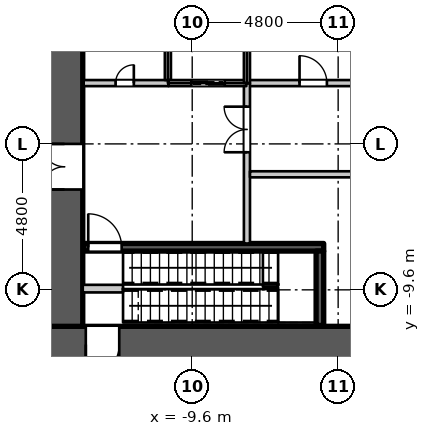
"""IFC4 building model, lengths in metres.
Left out: names, types, materials, properties, quantities, classifications, styles, units other than length and angle.
Written with IfcOpenShell. Run it as: python <this file> out.ifc"""

import sys

from ifc_helpers import new_model, si_unit, direction, frame, frame_2d, origin, place, context, subcontext, project, spatial, rectangle, extrude, element, fill, save


model = new_model("IFC4")
c1 = context("Model", 3, precision=1e-05, world=origin(), true_north=direction((0.0, 1.0)))
c2 = subcontext(c1, "Body", "Model", "MODEL_VIEW")
j1 = project(units=[si_unit("LENGTHUNIT", "METRE"), si_unit("PLANEANGLEUNIT", "RADIAN")], contexts=[c1])
p1 = place(None, origin())
s1 = spatial("IfcSite", under=j1, at=p1, CompositionType="ELEMENT")
p2 = place(p1, origin())
s2 = spatial("IfcBuilding", under=s1, at=p2, CompositionType="ELEMENT")
p3 = place(p2, origin())
s3 = spatial("IfcBuildingStorey", under=s2, at=p3, CompositionType="ELEMENT", Elevation=0.0)
p4 = place(p3, frame((-14.4, -11.4, 0.0), z_axis=(0.0, 0.0, 1.0), x_axis=(1.0, 0.0, 0.0)))
e1 = element("IfcWall", 1, at=p4, inside=s3, PredefinedType="SHEAR", context=c2, shape_type="SweptSolid", body=[
    extrude(rectangle(XDim=28.8, YDim=1.2, at=frame_2d((14.4, 0.0))), origin(), (0.0, 0.0, 1.0), 6.0),
])
p5 = place(p4, frame((1.3, 0.0, 0.0)))
e2 = element("IfcOpeningElement", 2, at=p5, cuts=e1, PredefinedType="OPENING", context=c2, shape_type="SweptSolid", body=[
    extrude(rectangle(XDim=1.1, YDim=2.2, at=frame_2d((0.55, 1.1))), frame((0.0, 0.61, 0.0), z_axis=(0.0, -1.0, 0.0), x_axis=(1.0, 0.0, 0.0)), (0.0, 0.0, 1.0), 1.22),
])
p6 = place(p4, frame((26.4, 0.0, 0.0)))
e3 = element("IfcOpeningElement", 3, at=p6, cuts=e1, PredefinedType="OPENING", context=c2, shape_type="SweptSolid", body=[
    extrude(rectangle(XDim=1.1, YDim=2.2, at=frame_2d((0.55, 1.1))), frame((0.0, 0.61, 0.0), z_axis=(0.0, -1.0, 0.0), x_axis=(1.0, 0.0, 0.0)), (0.0, 0.0, 1.0), 1.22),
])
p7 = place(p3, frame((-13.8, -10.8, 0.0), z_axis=(0.0, 0.0, 1.0), x_axis=(0.0, 1.0, 0.0)))
e4 = element("IfcWall", 4, at=p7, inside=s3, PredefinedType="SHEAR", context=c2, shape_type="SweptSolid", body=[
    extrude(rectangle(XDim=21.6, YDim=1.2, at=frame_2d((10.8, 0.0))), origin(), (0.0, 0.0, 1.0), 6.0),
])
p8 = place(p7, frame((15.5, 0.0, 0.0)))
e5 = element("IfcOpeningElement", 5, at=p8, cuts=e4, PredefinedType="OPENING", context=c2, shape_type="SweptSolid", body=[
    extrude(rectangle(XDim=1.5, YDim=2.4, at=frame_2d((0.75, 1.2))), frame((0.0, 0.61, 0.0), z_axis=(0.0, -1.0, 0.0), x_axis=(1.0, 0.0, 0.0)), (0.0, 0.0, 1.0), 1.22),
])
p9 = place(p7, frame((4.5, 0.0, 0.0)))
e6 = element("IfcOpeningElement", 6, at=p9, cuts=e4, PredefinedType="OPENING", context=c2, shape_type="SweptSolid", body=[
    extrude(rectangle(XDim=1.5, YDim=2.4, at=frame_2d((0.75, 1.2))), frame((0.0, 0.61, 0.0), z_axis=(0.0, -1.0, 0.0), x_axis=(1.0, 0.0, 0.0)), (0.0, 0.0, 1.0), 1.22),
])
p10 = place(p7, frame((19.13, 0.0, 0.0)))
e7 = element("IfcOpeningElement", 7, at=p10, cuts=e4, PredefinedType="OPENING", context=c2, shape_type="SweptSolid", body=[
    extrude(rectangle(XDim=1.1, YDim=2.2, at=frame_2d((0.55, 1.1))), frame((0.0, 0.61, 0.0), z_axis=(0.0, -1.0, 0.0), x_axis=(1.0, 0.0, 0.0)), (0.0, 0.0, 1.0), 1.22),
])
p11 = place(p3, frame((-7.82, -2.8, 0.0), z_axis=(0.0, 0.0, 1.0), x_axis=(1.0, 0.0, 0.0)))
e8 = element("IfcWall", 8, at=p11, inside=s3, PredefinedType="PARTITIONING", context=c2, shape_type="SweptSolid", body=[
    extrude(rectangle(XDim=4.44, YDim=0.2, at=frame_2d((2.22, 0.0))), origin(), (0.0, 0.0, 1.0), 5.65),
])
p12 = place(p11, frame((1.75, 0.0, 0.0)))
e9 = element("IfcOpeningElement", 9, at=p12, cuts=e8, PredefinedType="OPENING", context=c2, shape_type="SweptSolid", body=[
    extrude(rectangle(XDim=0.9, YDim=2.2, at=frame_2d((0.45, 1.1))), frame((0.0, 0.11, 0.0), z_axis=(0.0, -1.0, 0.0), x_axis=(1.0, 0.0, 0.0)), (0.0, 0.0, 1.0), 0.22),
])
p13 = place(p3, frame((-7.8, -8.075, 0.0), z_axis=(0.0, 0.0, 1.0), x_axis=(0.0, 1.0, 0.0)))
e10 = element("IfcWall", 10, at=p13, inside=s3, PredefinedType="PARTITIONING", context=c2, shape_type="SweptSolid", body=[
    extrude(rectangle(XDim=5.275, YDim=0.2, at=frame_2d((2.637, 0.0))), origin(), (0.0, 0.0, 1.0), 5.65),
])
p14 = place(p13, frame((3.0, 0.0, 0.0)))
e11 = element("IfcOpeningElement", 11, at=p14, cuts=e10, PredefinedType="OPENING", context=c2, shape_type="SweptSolid", body=[
    extrude(rectangle(XDim=1.5, YDim=2.4, at=frame_2d((0.75, 1.2))), frame((0.0, 0.11, 0.0), z_axis=(0.0, -1.0, 0.0), x_axis=(1.0, 0.0, 0.0)), (0.0, 0.0, 1.0), 0.22),
])
p15 = place(p3, frame((-7.7, -5.8, 0.0), z_axis=(0.0, 0.0, 1.0), x_axis=(1.0, 0.0, 0.0)))
e12 = element("IfcWall", 12, at=p15, inside=s3, PredefinedType="PARTITIONING", context=c2, shape_type="SweptSolid", body=[
    extrude(rectangle(XDim=20.87, YDim=0.2, at=frame_2d((10.435, 0.0))), origin(), (0.0, 0.0, 1.0), 5.65),
])
p16 = place(p15, frame((6.15, 0.0, 0.0)))
e13 = element("IfcOpeningElement", 13, at=p16, cuts=e12, PredefinedType="OPENING", context=c2, shape_type="SweptSolid", body=[
    extrude(rectangle(XDim=0.9, YDim=2.2, at=frame_2d((0.45, 1.1))), frame((0.0, 0.11, 0.0), z_axis=(0.0, -1.0, 0.0), x_axis=(1.0, 0.0, 0.0)), (0.0, 0.0, 1.0), 0.22),
])
p17 = place(p15, frame((16.45, 0.0, 0.0)))
e14 = element("IfcOpeningElement", 14, at=p17, cuts=e12, PredefinedType="OPENING", context=c2, shape_type="SweptSolid", body=[
    extrude(rectangle(XDim=0.9, YDim=2.2, at=frame_2d((0.45, 1.1))), frame((0.0, 0.11, 0.0), z_axis=(0.0, -1.0, 0.0), x_axis=(1.0, 0.0, 0.0)), (0.0, 0.0, 1.0), 0.22),
])
p18 = place(p3, frame((-13.17, -2.8, 0.0), z_axis=(0.0, 0.0, 1.0), x_axis=(1.0, 0.0, 0.0)))
e15 = element("IfcWall", 15, at=p18, inside=s3, PredefinedType="PARTITIONING", context=c2, shape_type="SweptSolid", body=[
    extrude(rectangle(XDim=2.79, YDim=0.2, at=frame_2d((1.395, 0.0))), origin(), (0.0, 0.0, 1.0), 5.65),
])
p19 = place(p18, frame((1.05, 0.0, 0.0)))
e16 = element("IfcOpeningElement", 16, at=p19, cuts=e15, PredefinedType="OPENING", context=c2, shape_type="SweptSolid", body=[
    extrude(rectangle(XDim=0.6, YDim=2.0, at=frame_2d((0.3, 1.0))), frame((0.0, 0.11, 0.0), z_axis=(0.0, -1.0, 0.0), x_axis=(1.0, 0.0, 0.0)), (0.0, 0.0, 1.0), 0.22),
])
p20 = place(p3, frame((-10.4, -2.7, 0.0), z_axis=(0.0, 0.0, 1.0), x_axis=(0.0, 1.0, 0.0)))
e17 = element("IfcWall", 17, at=p20, inside=s3, PredefinedType="PARTITIONING", context=c2, shape_type="SweptSolid", body=[
    extrude(rectangle(XDim=2.7, YDim=0.2, at=frame_2d((1.35, 0.0))), origin(), (0.0, 0.0, 1.0), 5.65),
])
p21 = place(p3, frame((-10.38, -2.8, 0.0), z_axis=(0.0, 0.0, 1.0), x_axis=(1.0, 0.0, 0.0)))
e18 = element("IfcWall", 18, at=p21, inside=s3, PredefinedType="PARTITIONING", context=c2, shape_type="SweptSolid", body=[
    extrude(rectangle(XDim=2.56, YDim=0.2, at=frame_2d((1.28, 0.0))), origin(), (0.0, 0.0, 1.0), 5.65),
])
p22 = place(p21, frame((0.75, 0.0, 0.0)))
e19 = element("IfcOpeningElement", 19, at=p22, cuts=e18, PredefinedType="OPENING", context=c2, shape_type="SweptSolid", body=[
    extrude(rectangle(XDim=1.1, YDim=2.2, at=frame_2d((0.55, 1.1))), frame((0.0, 0.11, 0.0), z_axis=(0.0, -1.0, 0.0), x_axis=(1.0, 0.0, 0.0)), (0.0, 0.0, 1.0), 0.22),
])
p23 = place(p3, frame((-7.8, -2.8, 0.0), z_axis=(0.0, 0.0, 1.0), x_axis=(0.0, 1.0, 0.0)))
e20 = element("IfcWall", 20, at=p23, inside=s3, PredefinedType="PARTITIONING", context=c2, shape_type="SweptSolid", body=[
    extrude(rectangle(XDim=2.8, YDim=0.2, at=frame_2d((1.4, 0.0))), origin(), (0.0, 0.0, 1.0), 5.65),
])
p24 = place(p3, frame((-13.17, -8.2, 0.0), z_axis=(0.0, 0.0, 1.0), x_axis=(1.0, 0.0, 0.0)))
e21 = element("IfcWall", 21, at=p24, inside=s3, PredefinedType="SHEAR", context=c2, shape_type="SweptSolid", body=[
    extrude(rectangle(XDim=7.895, YDim=0.25, at=frame_2d((3.948, 0.0))), origin(), (0.0, 0.0, 1.0), 5.65),
])
p25 = place(p24, frame((0.15, 0.0, 0.0)))
e22 = element("IfcOpeningElement", 22, at=p25, cuts=e21, PredefinedType="OPENING", context=c2, shape_type="SweptSolid", body=[
    extrude(rectangle(XDim=1.1, YDim=2.2, at=frame_2d((0.55, 1.1))), frame((0.0, 0.135, 0.0), z_axis=(0.0, -1.0, 0.0), x_axis=(1.0, 0.0, 0.0)), (0.0, 0.0, 1.0), 0.27),
])
p26 = place(p3, frame((-5.4, -10.77, 0.0), z_axis=(0.0, 0.0, 1.0), x_axis=(0.0, 1.0, 0.0)))
e23 = element("IfcWall", 23, at=p26, inside=s3, PredefinedType="SHEAR", context=c2, shape_type="SweptSolid", body=[
    extrude(rectangle(XDim=2.445, YDim=0.25, at=frame_2d((1.223, 0.0))), origin(), (0.0, 0.0, 1.0), 5.65),
])
p27 = place(p3, frame((-13.2, -9.56, 0.0), z_axis=(0.0, 0.0, 1.0), x_axis=(1.0, 0.0, 0.0)))
e24 = element("IfcWall", 24, at=p27, inside=s3, PredefinedType="PARTITIONING", context=c2, shape_type="SweptSolid", body=[
    extrude(rectangle(XDim=1.325, YDim=0.25, at=frame_2d((0.663, 0.0))), origin(), (0.0, 0.0, 1.0), 5.65),
])
p28 = place(p19, origin())
e25 = element("IfcDoor", 25, at=p28, inside=s3, OperationType="SINGLE_SWING_RIGHT", PredefinedType="DOOR", context=c2, shape_type="SweptSolid", body=[
    extrude(rectangle(XDim=0.6, YDim=2.0, at=frame_2d((0.3, 1.0))), frame((0.0, 0.025, 0.0), z_axis=(0.0, -1.0, 0.0), x_axis=(1.0, 0.0, 0.0)), (0.0, 0.0, 1.0), 0.05),
])
fill(e16, e25)
p29 = place(p12, origin())
e26 = element("IfcDoor", 26, at=p29, inside=s3, OperationType="SINGLE_SWING_LEFT", PredefinedType="DOOR", context=c2, shape_type="SweptSolid", body=[
    extrude(rectangle(XDim=0.9, YDim=2.2, at=frame_2d((0.45, 1.1))), frame((0.0, 0.025, 0.0), z_axis=(0.0, -1.0, 0.0), x_axis=(1.0, 0.0, 0.0)), (0.0, 0.0, 1.0), 0.05),
])
fill(e9, e26)
p30 = place(p22, origin())
e27 = element("IfcDoor", 27, at=p30, inside=s3, OperationType="DOUBLE_DOOR_SLIDING", PredefinedType="DOOR", context=c2, shape_type="SweptSolid", body=[
    extrude(rectangle(XDim=1.1, YDim=2.2, at=frame_2d((0.55, 1.1))), frame((0.0, 0.025, 0.0), z_axis=(0.0, -1.0, 0.0), x_axis=(1.0, 0.0, 0.0)), (0.0, 0.0, 1.0), 0.05),
])
fill(e19, e27)
p31 = place(p25, origin())
e28 = element("IfcDoor", 28, at=p31, inside=s3, OperationType="SINGLE_SWING_LEFT", PredefinedType="DOOR", context=c2, shape_type="SweptSolid", body=[
    extrude(rectangle(XDim=1.1, YDim=2.2, at=frame_2d((0.55, 1.1))), frame((0.0, 0.025, 0.0), z_axis=(0.0, -1.0, 0.0), x_axis=(1.0, 0.0, 0.0)), (0.0, 0.0, 1.0), 0.05),
])
fill(e22, e28)
p32 = place(p14, origin())
e29 = element("IfcDoor", 29, at=p32, inside=s3, OperationType="DOUBLE_DOOR_SINGLE_SWING", PredefinedType="DOOR", context=c2, shape_type="SweptSolid", body=[
    extrude(rectangle(XDim=1.5, YDim=2.4, at=frame_2d((0.75, 1.2))), frame((0.0, 0.025, 0.0), z_axis=(0.0, -1.0, 0.0), x_axis=(1.0, 0.0, 0.0)), (0.0, 0.0, 1.0), 0.05),
])
fill(e11, e29)
p33 = place(p9, origin())
e30 = element("IfcDoor", 30, at=p33, inside=s3, OperationType="DOUBLE_DOOR_SINGLE_SWING", PredefinedType="DOOR", context=c2, shape_type="SweptSolid", body=[
    extrude(rectangle(XDim=1.5, YDim=2.4, at=frame_2d((0.75, 1.2))), frame((0.0, 0.025, 0.0), z_axis=(0.0, -1.0, 0.0), x_axis=(1.0, 0.0, 0.0)), (0.0, 0.0, 1.0), 0.05),
])
fill(e6, e30)
p34 = place(p5, origin())
e31 = element("IfcDoor", 31, at=p34, inside=s3, OperationType="SINGLE_SWING_RIGHT", PredefinedType="DOOR", context=c2, shape_type="SweptSolid", body=[
    extrude(rectangle(XDim=1.1, YDim=2.2, at=frame_2d((0.55, 1.1))), frame((0.0, 0.025, 0.0), z_axis=(0.0, -1.0, 0.0), x_axis=(1.0, 0.0, 0.0)), (0.0, 0.0, 1.0), 0.05),
])
fill(e2, e31)
save(model, sys.argv[1])
